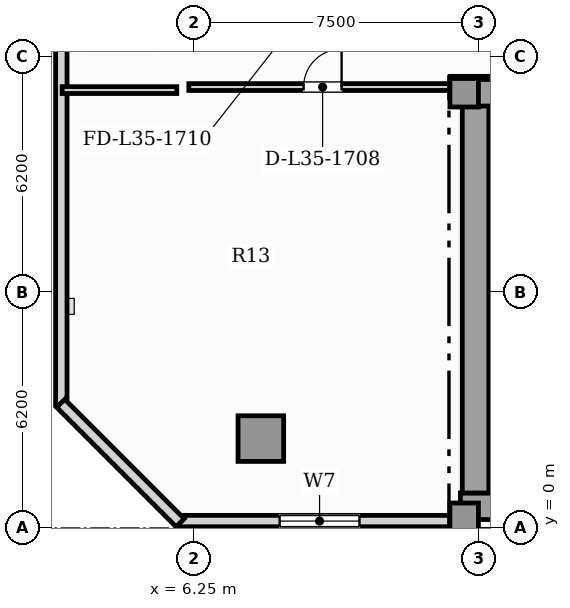
"""IFC4 building model, lengths in metres.
Left out: names, types, materials, properties, quantities, classifications, styles, units other than length and angle.
Written with IfcOpenShell. Run it as: python <this file> out.ifc"""

import sys

from ifc_helpers import new_model, si_unit, direction, frame, frame_2d, origin, origin_2d, place, context, subcontext, project, spatial, rectangle, hollow_rectangle, extrude, element, fill, save


model = new_model("IFC4")
c1 = context("Model", 3, precision=1e-05, world=origin(), true_north=direction((0.0, 1.0)))
c2 = subcontext(c1, "Body", "Model", "MODEL_VIEW")
j1 = project(units=[si_unit("LENGTHUNIT", "METRE"), si_unit("PLANEANGLEUNIT", "RADIAN")], contexts=[c1])
p1 = place(None, origin())
s1 = spatial("IfcSite", under=j1, at=p1, CompositionType="ELEMENT")
p2 = place(p1, origin())
s2 = spatial("IfcBuilding", under=s1, at=p2, CompositionType="ELEMENT")
p3 = place(p2, frame((0.0, 0.0, 145.2)))
s3 = spatial("IfcBuildingStorey", under=s2, at=p3, CompositionType="ELEMENT", Elevation=145.2)
p4 = place(p3, frame((13.25, 0.57, 0.0), z_axis=(0.0, 0.0, 1.0), x_axis=(1.0, 0.0, 0.0)))
e1 = element("IfcWall", 1, at=p4, inside=s3, PredefinedType="SHEAR", context=c2, shape_type="SweptSolid", body=[
    extrude(rectangle(XDim=31.0, YDim=0.7, at=frame_2d((15.5, 0.0))), origin(), (0.0, 0.0, 1.0), 3.63),
])
p5 = place(p3, frame((13.65, 0.92, 0.0), z_axis=(0.0, 0.0, 1.0), x_axis=(0.0, 1.0, 0.0)))
e2 = element("IfcWall", 2, at=p5, inside=s3, PredefinedType="SHEAR", context=c2, shape_type="SweptSolid", body=[
    extrude(rectangle(XDim=10.53, YDim=0.7, at=frame_2d((5.265, 0.0))), origin(), (0.0, 0.0, 1.0), 3.63),
])
p6 = place(p3, frame((13.25, 11.45, 0.0), z_axis=(0.0, 0.0, 1.0), x_axis=(1.0, 0.0, 0.0)))
e3 = element("IfcWall", 3, at=p6, inside=s3, PredefinedType="SHEAR", context=c2, shape_type="SweptSolid", body=[
    extrude(rectangle(XDim=2.95, YDim=0.7, at=frame_2d((1.475, 0.0))), origin(), (0.0, 0.0, 1.0), 3.63),
])
for number, where, z_axis, x_axis in (
    (4, (13.35, 0.28, 0.0), (0.0, 0.0, 1.0), (1.0, 0.0, 0.0)),
    (5, (13.35, 11.45, 0.0), (0.0, 0.0, 1.0), (1.0, 0.0, 0.0)),
):
    element("IfcColumn", number, at=place(p3, frame(where, z_axis=z_axis, x_axis=x_axis)), inside=s3, PredefinedType="COLUMN", context=c2, shape_type="SweptSolid", body=[
        extrude(rectangle(XDim=0.75, YDim=0.75, at=origin_2d()), origin(), (0.0, 0.0, 1.0), 3.85),
    ])
p7 = place(p3, frame((8.0, 2.35, 0.0), z_axis=(0.0, 0.0, 1.0), x_axis=(1.0, 0.0, 0.0)))
e6 = element("IfcColumn", 6, at=p7, inside=s3, PredefinedType="USERDEFINED", context=c2, shape_type="SweptSolid", body=[
    extrude(hollow_rectangle(XDim=1.2, YDim=1.2, WallThickness=0.07, at=origin_2d()), origin(), (0.0, 0.0, 1.0), 3.85),
])
p8 = place(p3, frame((5.84, 0.18, 0.0), z_axis=(0.0, 0.0, 1.0), x_axis=(1.0, 0.0, 0.0)))
e7 = element("IfcWall", 7, at=p8, inside=s3, PredefinedType="SOLIDWALL", context=c2, shape_type="SweptSolid", body=[
    extrude(rectangle(XDim=7.41, YDim=0.3, at=frame_2d((3.705, 0.0))), origin(), (0.0, 0.0, 1.0), 3.63),
])
p9 = place(p8, frame((2.655, 0.0, 0.85)))
e8 = element("IfcOpeningElement", 8, at=p9, cuts=e7, PredefinedType="OPENING", context=c2, shape_type="SweptSolid", body=[
    extrude(rectangle(XDim=2.1, YDim=2.05, at=frame_2d((1.05, 1.025))), frame((0.0, 0.16, 0.0), z_axis=(0.0, -1.0, 0.0), x_axis=(1.0, 0.0, 0.0)), (0.0, 0.0, 1.0), 0.32),
])
p10 = place(p3, frame((2.75, 39.96, 0.0), z_axis=(0.0, 0.0, 1.0), x_axis=(0.0, -1.0, 0.0)))
e9 = element("IfcWall", 9, at=p10, inside=s3, PredefinedType="SOLIDWALL", context=c2, shape_type="SweptSolid", body=[
    extrude(rectangle(XDim=36.72, YDim=0.3, at=frame_2d((18.36, 0.0))), origin(), (0.0, 0.0, 1.0), 3.63),
])
p11 = place(p10, frame((5.26, 0.0, 0.95)))
e10 = element("IfcOpeningElement", 10, at=p11, cuts=e9, PredefinedType="OPENING", context=c2, shape_type="SweptSolid", body=[
    extrude(rectangle(XDim=0.9, YDim=1.5, at=frame_2d((0.45, 0.75))), frame((0.0, 0.16, 0.0), z_axis=(0.0, -1.0, 0.0), x_axis=(1.0, 0.0, 0.0)), (0.0, 0.0, 1.0), 0.32),
])
p12 = place(p10, frame((13.314, 0.0, 0.9)))
e11 = element("IfcOpeningElement", 11, at=p12, cuts=e9, PredefinedType="OPENING", context=c2, shape_type="SweptSolid", body=[
    extrude(rectangle(XDim=1.5, YDim=1.95, at=frame_2d((0.75, 0.975))), frame((0.0, 0.16, 0.0), z_axis=(0.0, -1.0, 0.0), x_axis=(1.0, 0.0, 0.0)), (0.0, 0.0, 1.0), 0.32),
])
p13 = place(p3, frame((2.734, 3.278, 0.0), z_axis=(0.0, 0.0, 1.0), x_axis=(0.707106781187, -0.707106781187, 0.0)))
e12 = element("IfcWall", 12, at=p13, inside=s3, PredefinedType="SOLIDWALL", context=c2, shape_type="SweptSolid", body=[
    extrude(rectangle(XDim=4.445, YDim=0.3, at=frame_2d((2.223, 0.0))), origin(), (0.0, 0.0, 1.0), 3.63),
])
p14 = place(p3, frame((14.04, 8.52, 0.0), z_axis=(0.0, 0.0, 1.0), x_axis=(1.0, 0.0, 0.0)))
e13 = element("IfcWall", 13, at=p14, inside=s3, PredefinedType="SOLIDWALL", context=c2, shape_type="SweptSolid", body=[
    extrude(rectangle(XDim=3.4, YDim=0.22, at=frame_2d((1.7, 0.0))), origin(), (0.0, 0.0, 1.0), 3.63),
])
p15 = place(p14, frame((1.125, 0.0, 0.0)))
e14 = element("IfcOpeningElement", 14, at=p15, cuts=e13, PredefinedType="OPENING", context=c2, shape_type="SweptSolid", body=[
    extrude(rectangle(XDim=1.15, YDim=2.2, at=frame_2d((0.575, 1.1))), frame((0.0, 0.12, 0.0), z_axis=(0.0, -1.0, 0.0), x_axis=(1.0, 0.0, 0.0)), (0.0, 0.0, 1.0), 0.24),
])
p16 = place(p3, frame((6.105, 11.6, 0.0), z_axis=(0.0, 0.0, 1.0), x_axis=(1.0, 0.0, 0.0)))
e15 = element("IfcWall", 15, at=p16, inside=s3, PredefinedType="PARTITIONING", context=c2, shape_type="SweptSolid", body=[
    extrude(rectangle(XDim=7.04, YDim=0.18, at=frame_2d((3.52, 0.0))), origin(), (0.0, 0.0, 1.0), 3.63),
])
p17 = place(p16, frame((3.02, 0.0, 0.0)))
e16 = element("IfcOpeningElement", 16, at=p17, cuts=e15, PredefinedType="OPENING", context=c2, shape_type="SweptSolid", body=[
    extrude(rectangle(XDim=1.0, YDim=2.15, at=frame_2d((0.5, 1.075))), frame((0.0, 0.1, 0.0), z_axis=(0.0, -1.0, 0.0), x_axis=(1.0, 0.0, 0.0)), (0.0, 0.0, 1.0), 0.2),
])
p18 = place(p3, frame((2.772, 11.52, 0.0), z_axis=(0.0, 0.0, 1.0), x_axis=(1.0, 0.0, 0.0)))
e17 = element("IfcWall", 17, at=p18, inside=s3, PredefinedType="PARTITIONING", context=c2, shape_type="SweptSolid", body=[
    extrude(rectangle(XDim=3.015, YDim=0.18, at=frame_2d((1.508, 0.0))), origin(), (0.0, 0.0, 1.0), 3.63),
])
p19 = place(p9, origin())
e18 = element("IfcWindow", 18, at=p19, inside=s3, PartitioningType="SINGLE_PANEL", PredefinedType="WINDOW", context=c2, shape_type="SweptSolid", body=[
    extrude(rectangle(XDim=2.1, YDim=2.05, at=frame_2d((1.05, 1.025))), frame((0.0, 0.03, 0.0), z_axis=(0.0, -1.0, 0.0), x_axis=(1.0, 0.0, 0.0)), (0.0, 0.0, 1.0), 0.06),
])
fill(e8, e18)
p20 = place(p17, origin())
e19 = element("IfcDoor", 19, at=p20, inside=s3, OperationType="SINGLE_SWING_RIGHT", PredefinedType="DOOR", context=c2, shape_type="SweptSolid", body=[
    extrude(rectangle(XDim=1.0, YDim=2.15, at=frame_2d((0.5, 1.075))), frame((0.0, 0.025, 0.0), z_axis=(0.0, -1.0, 0.0), x_axis=(1.0, 0.0, 0.0)), (0.0, 0.0, 1.0), 0.05),
])
fill(e16, e19)
save(model, sys.argv[1])
